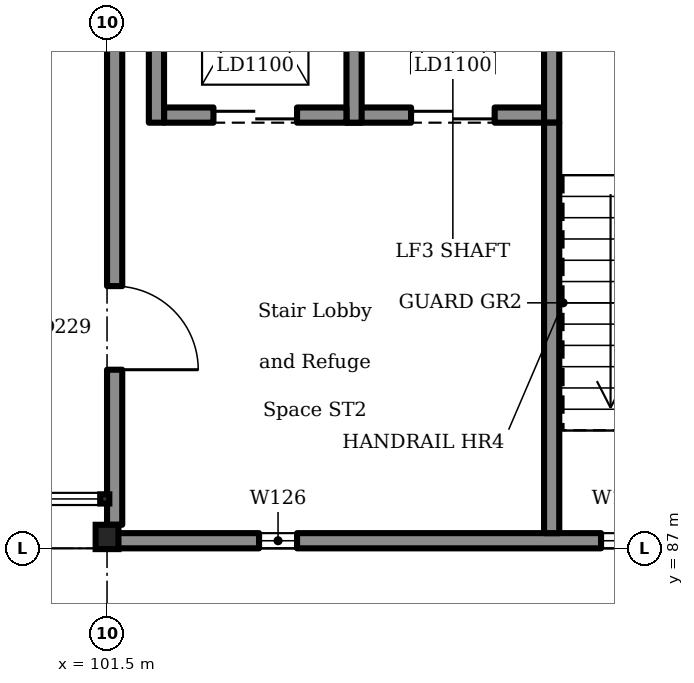
"""IFC4 building model, lengths in metres.
Left out: names, types, materials, properties, quantities, classifications, styles, units other than length and angle.
Written with IfcOpenShell. Run it as: python <this file> out.ifc"""

import sys

from ifc_helpers import new_model, si_unit, direction, frame, frame_2d, origin, origin_2d, place, context, subcontext, project, spatial, rectangle, i_section, extrude, element, fill, save


model = new_model("IFC4")
c1 = context("Model", 3, precision=1e-05, world=origin(), true_north=direction((0.0, 1.0)))
c2 = subcontext(c1, "Body", "Model", "MODEL_VIEW")
j1 = project(units=[si_unit("LENGTHUNIT", "METRE"), si_unit("PLANEANGLEUNIT", "RADIAN")], contexts=[c1])
p1 = place(None, origin())
s1 = spatial("IfcSite", under=j1, at=p1, CompositionType="ELEMENT")
p2 = place(p1, origin())
s2 = spatial("IfcBuilding", under=s1, at=p2, CompositionType="ELEMENT")
p3 = place(p2, frame((0.0, 0.0, 14.4)))
s3 = spatial("IfcBuildingStorey", under=s2, at=p3, CompositionType="ELEMENT", Elevation=14.4)
p4 = place(p3, frame((104.65, 92.7, 0.0), z_axis=(0.0, 0.0, 1.0), x_axis=(1.0, 0.0, 0.0)))
e1 = element("IfcWall", 1, at=p4, inside=s3, PredefinedType="SOLIDWALL", context=c2, shape_type="SweptSolid", body=[
    extrude(rectangle(XDim=2.6, YDim=0.2, at=frame_2d((1.3, 0.0))), origin(), (0.0, 0.0, 1.0), 4.5),
])
p5 = place(p4, frame((0.85, 0.0, 0.0)))
e2 = element("IfcOpeningElement", 2, at=p5, cuts=e1, PredefinedType="OPENING", context=c2, shape_type="SweptSolid", body=[
    extrude(rectangle(XDim=1.1, YDim=2.1, at=frame_2d((0.55, 1.05))), frame((0.0, 0.11, 0.0), z_axis=(0.0, -1.0, 0.0), x_axis=(1.0, 0.0, 0.0)), (0.0, 0.0, 1.0), 0.22),
])
for number, where, z_axis, x_axis in (
    (3, (104.75, 92.6, 0.0), (0.0, 0.0, 1.0), (0.0, 1.0, 0.0)),
    (4, (107.35, 92.6, 0.0), (0.0, 0.0, 1.0), (0.0, 1.0, 0.0)),
):
    element("IfcWall", number, at=place(p3, frame(where, z_axis=z_axis, x_axis=x_axis)), inside=s3, PredefinedType="SOLIDWALL", context=c2, shape_type="SweptSolid", body=[
        extrude(rectangle(XDim=3.4, YDim=0.2, at=frame_2d((1.7, 0.0))), origin(), (0.0, 0.0, 1.0), 4.5),
    ])
p6 = place(p3, frame((102.25, 92.7, 0.0), z_axis=(0.0, 0.0, 1.0), x_axis=(1.0, 0.0, 0.0)))
e5 = element("IfcWall", 5, at=p6, inside=s3, PredefinedType="SOLIDWALL", context=c2, shape_type="SweptSolid", body=[
    extrude(rectangle(XDim=2.4, YDim=0.2, at=frame_2d((1.2, 0.0))), origin(), (0.0, 0.0, 1.0), 4.5),
])
p7 = place(p6, frame((0.65, 0.0, 0.0)))
e6 = element("IfcOpeningElement", 6, at=p7, cuts=e5, PredefinedType="OPENING", context=c2, shape_type="SweptSolid", body=[
    extrude(rectangle(XDim=1.1, YDim=2.1, at=frame_2d((0.55, 1.05))), frame((0.0, 0.11, 0.0), z_axis=(0.0, -1.0, 0.0), x_axis=(1.0, 0.0, 0.0)), (0.0, 0.0, 1.0), 0.22),
])
p8 = place(p3, frame((102.15, 92.6, 0.0), z_axis=(0.0, 0.0, 1.0), x_axis=(0.0, 1.0, 0.0)))
e7 = element("IfcWall", 7, at=p8, inside=s3, PredefinedType="SOLIDWALL", context=c2, shape_type="SweptSolid", body=[
    extrude(rectangle(XDim=3.4, YDim=0.2, at=frame_2d((1.7, 0.0))), origin(), (0.0, 0.0, 1.0), 4.5),
])
p9 = place(p3, frame((101.5, 87.15, 0.0), z_axis=(0.0, 0.0, 1.0), x_axis=(1.0, 0.0, 0.0)))
e8 = element("IfcColumn", 8, at=p9, inside=s3, PredefinedType="COLUMN", context=c2, shape_type="SweptSolid", body=[
    extrude(i_section(OverallWidth=0.3, OverallDepth=0.32, WebThickness=0.011, FlangeThickness=0.021, FilletRadius=0.027, at=origin_2d()), origin(), (0.0, 0.0, 1.0), 4.5),
])
p10 = place(p3, frame((101.6, 87.31, 0.0), z_axis=(0.0, 0.0, 1.0), x_axis=(0.0, 1.0, 0.0)))
e9 = element("IfcWall", 9, at=p10, inside=s3, PredefinedType="SOLIDWALL", context=c2, shape_type="SweptSolid", body=[
    extrude(rectangle(XDim=8.53, YDim=0.2, at=frame_2d((4.265, 0.0))), origin(), (0.0, 0.0, 1.0), 4.35),
])
p11 = place(p10, frame((2.04, 0.0, 0.0)))
e10 = element("IfcOpeningElement", 10, at=p11, cuts=e9, PredefinedType="OPENING", context=c2, shape_type="SweptSolid", body=[
    extrude(rectangle(XDim=1.1, YDim=2.1, at=frame_2d((0.55, 1.05))), frame((0.0, 0.11, 0.0), z_axis=(0.0, -1.0, 0.0), x_axis=(1.0, 0.0, 0.0)), (0.0, 0.0, 1.0), 0.22),
])
p12 = place(p3, frame((101.511, 87.1, 0.0), z_axis=(0.0, 0.0, 1.0), x_axis=(1.0, 0.0, 0.0)))
e11 = element("IfcWall", 11, at=p12, inside=s3, PredefinedType="SOLIDWALL", context=c2, shape_type="SweptSolid", body=[
    extrude(rectangle(XDim=8.978, YDim=0.2, at=frame_2d((4.489, 0.0))), origin(), (0.0, 0.0, 1.0), 4.35),
])
p13 = place(p12, frame((1.989, 0.0, 2.9)))
e12 = element("IfcOpeningElement", 12, at=p13, cuts=e11, PredefinedType="OPENING", context=c2, shape_type="SweptSolid", body=[
    extrude(rectangle(XDim=0.5, YDim=1.2, at=frame_2d((0.25, 0.6))), frame((0.0, 0.11, 0.0), z_axis=(0.0, -1.0, 0.0), x_axis=(1.0, 0.0, 0.0)), (0.0, 0.0, 1.0), 0.22),
])
p14 = place(p12, frame((6.489, 0.0, 2.9)))
e13 = element("IfcOpeningElement", 13, at=p14, cuts=e11, PredefinedType="OPENING", context=c2, shape_type="SweptSolid", body=[
    extrude(rectangle(XDim=0.5, YDim=1.2, at=frame_2d((0.25, 0.6))), frame((0.0, 0.11, 0.0), z_axis=(0.0, -1.0, 0.0), x_axis=(1.0, 0.0, 0.0)), (0.0, 0.0, 1.0), 0.22),
])
p15 = place(p3, frame((107.35, 87.2, 0.0), z_axis=(0.0, 0.0, 1.0), x_axis=(0.0, 1.0, 0.0)))
e14 = element("IfcWall", 14, at=p15, inside=s3, PredefinedType="SOLIDWALL", context=c2, shape_type="SweptSolid", body=[
    extrude(rectangle(XDim=5.4, YDim=0.2, at=frame_2d((2.7, 0.0))), origin(), (0.0, 0.0, 1.0), 4.35),
])
p16 = place(p5, origin())
e15 = element("IfcDoor", 15, at=p16, inside=s3, OperationType="SLIDING_TO_LEFT", PredefinedType="DOOR", context=c2, shape_type="SweptSolid", body=[
    extrude(rectangle(XDim=1.1, YDim=2.1, at=frame_2d((0.55, 1.05))), frame((0.0, 0.025, 0.0), z_axis=(0.0, -1.0, 0.0), x_axis=(1.0, 0.0, 0.0)), (0.0, 0.0, 1.0), 0.05),
])
fill(e2, e15)
p17 = place(p7, origin())
e16 = element("IfcDoor", 16, at=p17, inside=s3, OperationType="SLIDING_TO_LEFT", PredefinedType="DOOR", context=c2, shape_type="SweptSolid", body=[
    extrude(rectangle(XDim=1.1, YDim=2.1, at=frame_2d((0.55, 1.05))), frame((0.0, 0.025, 0.0), z_axis=(0.0, -1.0, 0.0), x_axis=(1.0, 0.0, 0.0)), (0.0, 0.0, 1.0), 0.05),
])
fill(e6, e16)
p18 = place(p13, origin())
e17 = element("IfcWindow", 17, at=p18, inside=s3, PartitioningType="SINGLE_PANEL", PredefinedType="WINDOW", context=c2, shape_type="SweptSolid", body=[
    extrude(rectangle(XDim=0.5, YDim=1.2, at=frame_2d((0.25, 0.6))), frame((0.0, 0.03, 0.0), z_axis=(0.0, -1.0, 0.0), x_axis=(1.0, 0.0, 0.0)), (0.0, 0.0, 1.0), 0.06),
])
fill(e12, e17)
p19 = place(p14, origin())
e18 = element("IfcWindow", 18, at=p19, inside=s3, PartitioningType="SINGLE_PANEL", PredefinedType="WINDOW", context=c2, shape_type="SweptSolid", body=[
    extrude(rectangle(XDim=0.5, YDim=1.2, at=frame_2d((0.25, 0.6))), frame((0.0, 0.03, 0.0), z_axis=(0.0, -1.0, 0.0), x_axis=(1.0, 0.0, 0.0)), (0.0, 0.0, 1.0), 0.06),
])
fill(e13, e18)
p20 = place(p11, frame((1.1, 0.0, 0.0), z_axis=(0.0, 0.0, 1.0), x_axis=(-1.0, 0.0, 0.0)))
e19 = element("IfcDoor", 19, at=p20, inside=s3, OperationType="SINGLE_SWING_LEFT", PredefinedType="DOOR", context=c2, shape_type="SweptSolid", body=[
    extrude(rectangle(XDim=1.1, YDim=2.1, at=frame_2d((0.55, 1.05))), frame((0.0, 0.025, 0.0), z_axis=(0.0, -1.0, 0.0), x_axis=(1.0, 0.0, 0.0)), (0.0, 0.0, 1.0), 0.05),
])
fill(e10, e19)
save(model, sys.argv[1])
